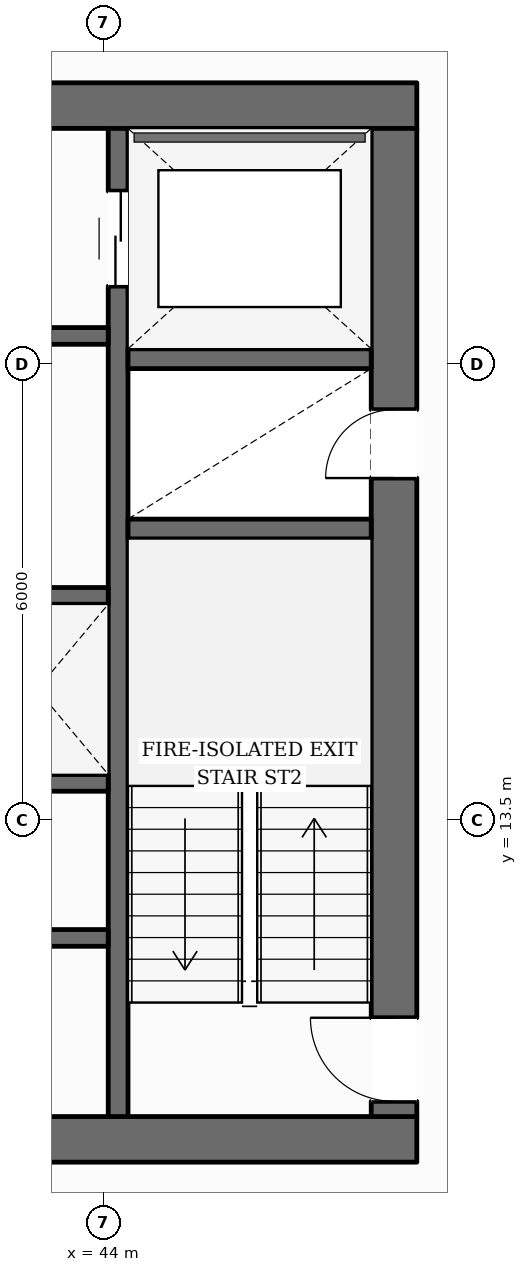
"""IFC4 building model, lengths in metres.
Left out: names, types, materials, properties, quantities, classifications, styles, units other than length and angle.
Written with IfcOpenShell. Run it as: python <this file> out.ifc"""

import sys

from ifc_helpers import new_model, si_unit, direction, frame, frame_2d, origin, place, context, subcontext, project, spatial, rectangle, extrude, element, fill, save


model = new_model("IFC4")
c1 = context("Model", 3, precision=1e-05, world=origin(), true_north=direction((0.0, 1.0)))
c2 = subcontext(c1, "Body", "Model", "MODEL_VIEW")
j1 = project(units=[si_unit("LENGTHUNIT", "METRE"), si_unit("PLANEANGLEUNIT", "RADIAN")], contexts=[c1])
p1 = place(None, origin())
s1 = spatial("IfcSite", under=j1, at=p1, CompositionType="ELEMENT")
p2 = place(p1, origin())
s2 = spatial("IfcBuilding", under=s1, at=p2, CompositionType="ELEMENT")
p3 = place(p2, frame((0.0, 0.0, 36.8)))
s3 = spatial("IfcBuildingStorey", under=s2, at=p3, CompositionType="ELEMENT", Elevation=36.8)
p4 = place(p3, frame((27.88, 9.3, 0.0), z_axis=(0.0, 0.0, 1.0), x_axis=(1.0, 0.0, 0.0)))
e1 = element("IfcWall", 1, at=p4, inside=s3, PredefinedType="SOLIDWALL", context=c2, shape_type="SweptSolid", body=[
    extrude(rectangle(XDim=20.24, YDim=0.6, at=frame_2d((10.12, 0.0))), origin(), (0.0, 0.0, 1.0), 3.59),
])
p5 = place(p4, frame((10.62, 0.0, 0.0)))
e2 = element("IfcOpeningElement", 2, at=p5, cuts=e1, PredefinedType="OPENING", context=c2, shape_type="SweptSolid", body=[
    extrude(rectangle(XDim=1.4, YDim=2.2, at=frame_2d((0.7, 1.1))), frame((0.0, 0.31, 0.0), z_axis=(0.0, -1.0, 0.0), x_axis=(1.0, 0.0, 0.0)), (0.0, 0.0, 1.0), 0.62),
])
p6 = place(p3, frame((27.88, 22.9, 0.0), z_axis=(0.0, 0.0, 1.0), x_axis=(1.0, 0.0, 0.0)))
e3 = element("IfcWall", 3, at=p6, inside=s3, PredefinedType="SOLIDWALL", context=c2, shape_type="SweptSolid", body=[
    extrude(rectangle(XDim=20.24, YDim=0.6, at=frame_2d((10.12, 0.0))), origin(), (0.0, 0.0, 1.0), 3.59),
])
p7 = place(p6, frame((6.395, 0.0, 0.0)))
e4 = element("IfcOpeningElement", 4, at=p7, cuts=e3, PredefinedType="OPENING", context=c2, shape_type="SweptSolid", body=[
    extrude(rectangle(XDim=1.05, YDim=2.15, at=frame_2d((0.525, 1.075))), frame((0.0, 0.31, 0.0), z_axis=(0.0, -1.0, 0.0), x_axis=(1.0, 0.0, 0.0)), (0.0, 0.0, 1.0), 0.62),
])
p8 = place(p6, frame((12.795, 0.0, 0.0)))
e5 = element("IfcOpeningElement", 5, at=p8, cuts=e3, PredefinedType="OPENING", context=c2, shape_type="SweptSolid", body=[
    extrude(rectangle(XDim=1.05, YDim=2.15, at=frame_2d((0.525, 1.075))), frame((0.0, 0.31, 0.0), z_axis=(0.0, -1.0, 0.0), x_axis=(1.0, 0.0, 0.0)), (0.0, 0.0, 1.0), 0.62),
])
p9 = place(p3, frame((47.82, 9.6, 0.0), z_axis=(0.0, 0.0, 1.0), x_axis=(0.0, 1.0, 0.0)))
e6 = element("IfcWall", 6, at=p9, inside=s3, PredefinedType="SOLIDWALL", context=c2, shape_type="SweptSolid", body=[
    extrude(rectangle(XDim=13.0, YDim=0.6, at=frame_2d((6.5, 0.0))), origin(), (0.0, 0.0, 1.0), 3.59),
])
p10 = place(p9, frame((0.2, 0.0, 0.0)))
e7 = element("IfcOpeningElement", 7, at=p10, cuts=e6, PredefinedType="OPENING", context=c2, shape_type="SweptSolid", body=[
    extrude(rectangle(XDim=1.1, YDim=2.15, at=frame_2d((0.55, 1.075))), frame((0.0, 0.31, 0.0), z_axis=(0.0, -1.0, 0.0), x_axis=(1.0, 0.0, 0.0)), (0.0, 0.0, 1.0), 0.62),
])
p11 = place(p9, frame((8.4, 0.0, 0.0)))
e8 = element("IfcOpeningElement", 8, at=p11, cuts=e6, PredefinedType="OPENING", context=c2, shape_type="SweptSolid", body=[
    extrude(rectangle(XDim=0.9, YDim=2.1, at=frame_2d((0.45, 1.05))), frame((0.0, 0.31, 0.0), z_axis=(0.0, -1.0, 0.0), x_axis=(1.0, 0.0, 0.0)), (0.0, 0.0, 1.0), 0.62),
])
p12 = place(p3, frame((44.19, 9.6, 0.0), z_axis=(0.0, 0.0, 1.0), x_axis=(0.0, 1.0, 0.0)))
e9 = element("IfcWall", 9, at=p12, inside=s3, PredefinedType="SHEAR", context=c2, shape_type="SweptSolid", body=[
    extrude(rectangle(XDim=13.0, YDim=0.26, at=frame_2d((6.5, 0.0))), origin(), (0.0, 0.0, 1.0), 3.59),
])
p13 = place(p12, frame((10.925, 0.0, 0.0)))
e10 = element("IfcOpeningElement", 10, at=p13, cuts=e9, PredefinedType="OPENING", context=c2, shape_type="SweptSolid", body=[
    extrude(rectangle(XDim=1.25, YDim=2.25, at=frame_2d((0.625, 1.125))), frame((0.0, 0.14, 0.0), z_axis=(0.0, -1.0, 0.0), x_axis=(1.0, 0.0, 0.0)), (0.0, 0.0, 1.0), 0.28),
])
for number, where, z_axis, x_axis in (
    (11, (44.32, 17.33, 0.0), (0.0, 0.0, 1.0), (1.0, 0.0, 0.0)),
    (12, (44.32, 19.57, 0.0), (0.0, 0.0, 1.0), (1.0, 0.0, 0.0)),
):
    element("IfcWall", number, at=place(p3, frame(where, z_axis=z_axis, x_axis=x_axis)), inside=s3, PredefinedType="SHEAR", context=c2, shape_type="SweptSolid", body=[
        extrude(rectangle(XDim=3.2, YDim=0.26, at=frame_2d((1.6, 0.0))), origin(), (0.0, 0.0, 1.0), 3.59),
    ])
p14 = place(p3, frame((31.94, 19.87, 0.0), z_axis=(0.0, 0.0, 1.0), x_axis=(1.0, 0.0, 0.0)))
e13 = element("IfcWall", 13, at=p14, inside=s3, PredefinedType="SOLIDWALL", context=c2, shape_type="SweptSolid", body=[
    extrude(rectangle(XDim=12.12, YDim=0.22, at=frame_2d((6.06, 0.0))), origin(), (0.0, 0.0, 1.0), 3.59),
])
p15 = place(p14, frame((6.3, 0.0, 0.0)))
e14 = element("IfcOpeningElement", 14, at=p15, cuts=e13, PredefinedType="OPENING", context=c2, shape_type="SweptSolid", body=[
    extrude(rectangle(XDim=1.1, YDim=2.15, at=frame_2d((0.55, 1.075))), frame((0.0, 0.12, 0.0), z_axis=(0.0, -1.0, 0.0), x_axis=(1.0, 0.0, 0.0)), (0.0, 0.0, 1.0), 0.24),
])
p16 = place(p14, frame((8.23, 0.0, 0.0)))
e15 = element("IfcOpeningElement", 15, at=p16, cuts=e13, PredefinedType="OPENING", context=c2, shape_type="SweptSolid", body=[
    extrude(rectangle(XDim=0.9, YDim=2.1, at=frame_2d((0.45, 1.05))), frame((0.0, 0.12, 0.0), z_axis=(0.0, -1.0, 0.0), x_axis=(1.0, 0.0, 0.0)), (0.0, 0.0, 1.0), 0.24),
])
p17 = place(p14, frame((10.45, 0.0, 0.0)))
e16 = element("IfcOpeningElement", 16, at=p17, cuts=e13, PredefinedType="OPENING", context=c2, shape_type="SweptSolid", body=[
    extrude(rectangle(XDim=0.9, YDim=2.1, at=frame_2d((0.45, 1.05))), frame((0.0, 0.12, 0.0), z_axis=(0.0, -1.0, 0.0), x_axis=(1.0, 0.0, 0.0)), (0.0, 0.0, 1.0), 0.24),
])
p18 = place(p3, frame((31.94, 16.45, 0.0), z_axis=(0.0, 0.0, 1.0), x_axis=(1.0, 0.0, 0.0)))
e17 = element("IfcWall", 17, at=p18, inside=s3, PredefinedType="SOLIDWALL", context=c2, shape_type="SweptSolid", body=[
    extrude(rectangle(XDim=12.12, YDim=0.22, at=frame_2d((6.06, 0.0))), origin(), (0.0, 0.0, 1.0), 3.59),
])
p19 = place(p3, frame((31.94, 13.99, 0.0), z_axis=(0.0, 0.0, 1.0), x_axis=(1.0, 0.0, 0.0)))
e18 = element("IfcWall", 18, at=p19, inside=s3, PredefinedType="SOLIDWALL", context=c2, shape_type="SweptSolid", body=[
    extrude(rectangle(XDim=12.12, YDim=0.22, at=frame_2d((6.06, 0.0))), origin(), (0.0, 0.0, 1.0), 3.59),
])
p20 = place(p19, frame((0.385, 0.0, 0.0)))
e19 = element("IfcOpeningElement", 19, at=p20, cuts=e18, PredefinedType="OPENING", context=c2, shape_type="SweptSolid", body=[
    extrude(rectangle(XDim=1.1, YDim=2.2, at=frame_2d((0.55, 1.1))), frame((0.0, 0.12, 0.0), z_axis=(0.0, -1.0, 0.0), x_axis=(1.0, 0.0, 0.0)), (0.0, 0.0, 1.0), 0.24),
])
p21 = place(p19, frame((2.435, 0.0, 0.0)))
e20 = element("IfcOpeningElement", 20, at=p21, cuts=e18, PredefinedType="OPENING", context=c2, shape_type="SweptSolid", body=[
    extrude(rectangle(XDim=1.1, YDim=2.2, at=frame_2d((0.55, 1.1))), frame((0.0, 0.12, 0.0), z_axis=(0.0, -1.0, 0.0), x_axis=(1.0, 0.0, 0.0)), (0.0, 0.0, 1.0), 0.24),
])
p22 = place(p19, frame((4.485, 0.0, 0.0)))
e21 = element("IfcOpeningElement", 21, at=p22, cuts=e18, PredefinedType="OPENING", context=c2, shape_type="SweptSolid", body=[
    extrude(rectangle(XDim=1.1, YDim=2.2, at=frame_2d((0.55, 1.1))), frame((0.0, 0.12, 0.0), z_axis=(0.0, -1.0, 0.0), x_axis=(1.0, 0.0, 0.0)), (0.0, 0.0, 1.0), 0.24),
])
p23 = place(p3, frame((40.28, 11.95, 0.0), z_axis=(0.0, 0.0, 1.0), x_axis=(1.0, 0.0, 0.0)))
e22 = element("IfcWall", 22, at=p23, inside=s3, PredefinedType="SOLIDWALL", context=c2, shape_type="SweptSolid", body=[
    extrude(rectangle(XDim=3.78, YDim=0.22, at=frame_2d((1.89, 0.0))), origin(), (0.0, 0.0, 1.0), 3.59),
])
p24 = place(p23, frame((1.55, 0.0, 0.0)))
e23 = element("IfcOpeningElement", 23, at=p24, cuts=e22, PredefinedType="OPENING", context=c2, shape_type="SweptSolid", body=[
    extrude(rectangle(XDim=0.9, YDim=2.1, at=frame_2d((0.45, 1.05))), frame((0.0, 0.12, 0.0), z_axis=(0.0, -1.0, 0.0), x_axis=(1.0, 0.0, 0.0)), (0.0, 0.0, 1.0), 0.24),
])
p25 = place(p3, frame((45.74, 44.571, 0.0), z_axis=(0.0, 0.0, 1.0), x_axis=(0.498692886701, -0.866778751905, 0.0)))
e24 = element("IfcWall", 24, at=p25, inside=s3, PredefinedType="STANDARD", context=c2, shape_type="SweptSolid", body=[
    extrude(rectangle(XDim=34.643, YDim=0.38, at=frame_2d((17.322, 0.0))), origin(), (0.0, 0.0, 1.0), 2.97),
])
p26 = place(p25, frame((30.536, 0.0, 0.65)))
e25 = element("IfcOpeningElement", 25, at=p26, cuts=e24, PredefinedType="OPENING", context=c2, shape_type="SweptSolid", body=[
    extrude(rectangle(XDim=1.65, YDim=1.75, at=frame_2d((0.825, 0.875))), frame((0.0, 0.2, 0.0), z_axis=(0.0, -1.0, 0.0), x_axis=(1.0, 0.0, 0.0)), (0.0, 0.0, 1.0), 0.4),
])
p27 = place(p25, frame((24.92, 0.0, 0.65)))
e26 = element("IfcOpeningElement", 26, at=p27, cuts=e24, PredefinedType="OPENING", context=c2, shape_type="SweptSolid", body=[
    extrude(rectangle(XDim=1.65, YDim=1.75, at=frame_2d((0.825, 0.875))), frame((0.0, 0.2, 0.0), z_axis=(0.0, -1.0, 0.0), x_axis=(1.0, 0.0, 0.0)), (0.0, 0.0, 1.0), 0.4),
])
p28 = place(p25, frame((13.69, 0.0, 0.65)))
e27 = element("IfcOpeningElement", 27, at=p28, cuts=e24, PredefinedType="OPENING", context=c2, shape_type="SweptSolid", body=[
    extrude(rectangle(XDim=1.65, YDim=1.75, at=frame_2d((0.825, 0.875))), frame((0.0, 0.2, 0.0), z_axis=(0.0, -1.0, 0.0), x_axis=(1.0, 0.0, 0.0)), (0.0, 0.0, 1.0), 0.4),
])
p29 = place(p25, frame((8.074, 0.0, 0.65)))
e28 = element("IfcOpeningElement", 28, at=p29, cuts=e24, PredefinedType="OPENING", context=c2, shape_type="SweptSolid", body=[
    extrude(rectangle(XDim=1.65, YDim=1.75, at=frame_2d((0.825, 0.875))), frame((0.0, 0.2, 0.0), z_axis=(0.0, -1.0, 0.0), x_axis=(1.0, 0.0, 0.0)), (0.0, 0.0, 1.0), 0.4),
])
p30 = place(p25, frame((2.459, 0.0, 0.65)))
e29 = element("IfcOpeningElement", 29, at=p30, cuts=e24, PredefinedType="OPENING", context=c2, shape_type="SweptSolid", body=[
    extrude(rectangle(XDim=1.65, YDim=1.75, at=frame_2d((0.825, 0.875))), frame((0.0, 0.2, 0.0), z_axis=(0.0, -1.0, 0.0), x_axis=(1.0, 0.0, 0.0)), (0.0, 0.0, 1.0), 0.4),
])
p31 = place(p10, origin())
e30 = element("IfcDoor", 30, at=p31, inside=s3, OperationType="SINGLE_SWING_RIGHT", PredefinedType="DOOR", context=c2, shape_type="SweptSolid", body=[
    extrude(rectangle(XDim=1.1, YDim=2.15, at=frame_2d((0.55, 1.075))), frame((0.0, 0.025, 0.0), z_axis=(0.0, -1.0, 0.0), x_axis=(1.0, 0.0, 0.0)), (0.0, 0.0, 1.0), 0.05),
])
fill(e7, e30)
p32 = place(p11, origin())
e31 = element("IfcDoor", 31, at=p32, inside=s3, OperationType="SINGLE_SWING_LEFT", PredefinedType="DOOR", context=c2, shape_type="SweptSolid", body=[
    extrude(rectangle(XDim=0.9, YDim=2.1, at=frame_2d((0.45, 1.05))), frame((0.0, 0.025, 0.0), z_axis=(0.0, -1.0, 0.0), x_axis=(1.0, 0.0, 0.0)), (0.0, 0.0, 1.0), 0.05),
])
fill(e8, e31)
p33 = place(p13, origin())
e32 = element("IfcDoor", 32, at=p33, inside=s3, OperationType="DOUBLE_DOOR_SLIDING", PredefinedType="DOOR", context=c2, shape_type="SweptSolid", body=[
    extrude(rectangle(XDim=1.25, YDim=2.25, at=frame_2d((0.625, 1.125))), frame((0.0, 0.025, 0.0), z_axis=(0.0, -1.0, 0.0), x_axis=(1.0, 0.0, 0.0)), (0.0, 0.0, 1.0), 0.05),
])
fill(e10, e32)
save(model, sys.argv[1])
